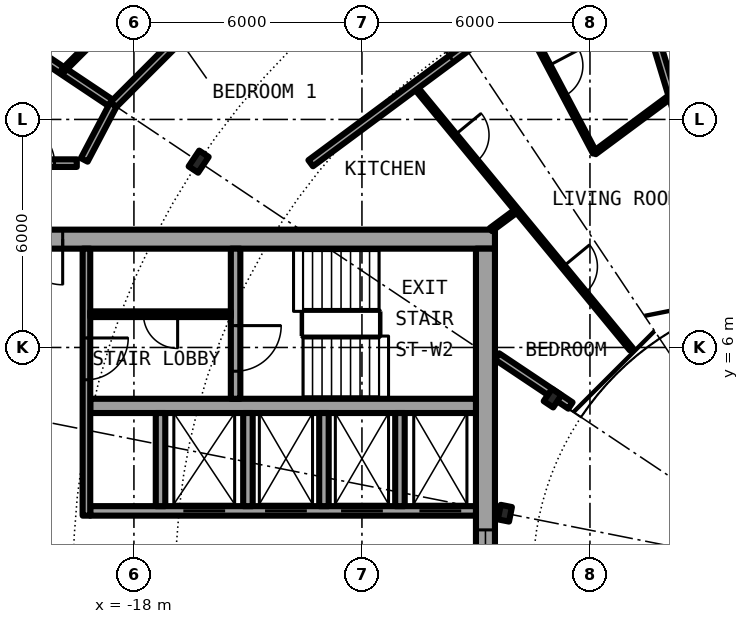
"""IFC4 building model, lengths in metres.
Left out: names, types, materials, properties, quantities, classifications, styles, units other than length and angle.
Written with IfcOpenShell. Run it as: python <this file> out.ifc"""

import sys

from ifc_helpers import new_model, si_unit, direction, frame, frame_2d, origin, origin_2d, place, context, subcontext, project, spatial, rectangle, i_section, extrude, element, fill, save


model = new_model("IFC4")
c1 = context("Model", 3, precision=1e-05, world=origin(), true_north=direction((0.0, 1.0)))
c2 = subcontext(c1, "Body", "Model", "MODEL_VIEW")
j1 = project(units=[si_unit("LENGTHUNIT", "METRE"), si_unit("PLANEANGLEUNIT", "RADIAN")], contexts=[c1])
p1 = place(None, origin())
s1 = spatial("IfcSite", under=j1, at=p1, CompositionType="ELEMENT")
p2 = place(p1, origin())
s2 = spatial("IfcBuilding", under=s1, at=p2, CompositionType="ELEMENT")
p3 = place(p2, frame((0.0, 0.0, 170.75)))
s3 = spatial("IfcBuildingStorey", under=s2, at=p3, CompositionType="ELEMENT", Elevation=170.75)
p4 = place(p3, frame((-16.297, 10.889, 0.0), z_axis=(0.0, 0.0, 1.0), x_axis=(-0.831469612303, 0.55557023302, 0.0)))
e1 = element("IfcColumn", 1, at=p4, inside=s3, PredefinedType="COLUMN", context=c2, shape_type="SweptSolid", body=[
    extrude(i_section(OverallWidth=0.3, OverallDepth=0.5, WebThickness=0.014, FlangeThickness=0.028, FilletRadius=0.027, at=origin_2d()), origin(), (0.0, 0.0, 1.0), 3.05),
])
for number, where, z_axis, x_axis in (
    (2, (-6.984, 4.667, 0.0), (0.0, 0.0, 1.0), (-0.831, 0.556, 0.0)),
    (3, (-8.239, 1.639, 0.0), (0.0, 0.0, 1.0), (-0.981, 0.195, 0.0)),
):
    element("IfcColumn", number, at=place(p3, frame(where, z_axis=z_axis, x_axis=x_axis)), inside=s3, PredefinedType="COLUMN", context=c2, shape_type="SweptSolid", body=[
        extrude(i_section(OverallWidth=0.3, OverallDepth=0.39, WebThickness=0.011, FlangeThickness=0.019, FilletRadius=0.027, at=origin_2d()), origin(), (0.0, 0.0, 1.0), 3.05),
    ])
p5 = place(p3, frame((-8.5, 8.85, 0.0), z_axis=(0.0, 0.0, 1.0), x_axis=(-1.0, 0.0, 0.0)))
e4 = element("IfcWall", 4, at=p5, inside=s3, PredefinedType="SHEAR", context=c2, shape_type="SweptSolid", body=[
    extrude(rectangle(XDim=13.6, YDim=0.5, at=frame_2d((6.8, 0.0))), origin(), (0.0, 0.0, 1.0), 3.05),
])
p6 = place(p5, frame((11.375, 0.0, 0.0)))
e5 = element("IfcOpeningElement", 5, at=p6, cuts=e4, PredefinedType="OPENING", context=c2, shape_type="SweptSolid", body=[
    extrude(rectangle(XDim=1.2, YDim=2.3, at=frame_2d((0.6, 1.15))), frame((0.0, 0.26, 0.0), z_axis=(0.0, -1.0, 0.0), x_axis=(1.0, 0.0, 0.0)), (0.0, 0.0, 1.0), 0.52),
])
p7 = place(p3, frame((-8.75, 8.6, 0.0), z_axis=(0.0, 0.0, 1.0), x_axis=(0.0, -1.0, 0.0)))
e6 = element("IfcWall", 6, at=p7, inside=s3, PredefinedType="SHEAR", context=c2, shape_type="SweptSolid", body=[
    extrude(rectangle(XDim=17.2, YDim=0.5, at=frame_2d((8.6, 0.0))), origin(), (0.0, 0.0, 1.0), 3.05),
])
p8 = place(p7, frame((7.4, 0.0, 0.1)))
e7 = element("IfcOpeningElement", 7, at=p8, cuts=e6, PredefinedType="OPENING", context=c2, shape_type="SweptSolid", body=[
    extrude(rectangle(XDim=2.4, YDim=2.2, at=frame_2d((1.2, 1.1))), frame((0.0, 0.26, 0.0), z_axis=(0.0, -1.0, 0.0), x_axis=(1.0, 0.0, 0.0)), (0.0, 0.0, 1.0), 0.52),
])
p9 = place(p3, frame((-9.0, 1.7, 0.0), z_axis=(0.0, 0.0, 1.0), x_axis=(-1.0, 0.0, 0.0)))
e8 = element("IfcWall", 8, at=p9, inside=s3, PredefinedType="SHEAR", context=c2, shape_type="SweptSolid", body=[
    extrude(rectangle(XDim=10.15, YDim=0.25, at=frame_2d((5.075, 0.0))), origin(), (0.0, 0.0, 1.0), 3.05),
])
p10 = place(p9, frame((0.387, 0.0, 0.0)))
e9 = element("IfcOpeningElement", 9, at=p10, cuts=e8, PredefinedType="OPENING", context=c2, shape_type="SweptSolid", body=[
    extrude(rectangle(XDim=1.1, YDim=2.3, at=frame_2d((0.55, 1.15))), frame((0.0, 0.135, 0.0), z_axis=(0.0, -1.0, 0.0), x_axis=(1.0, 0.0, 0.0)), (0.0, 0.0, 1.0), 0.27),
])
p11 = place(p9, frame((2.45, 0.0, 0.0)))
e10 = element("IfcOpeningElement", 10, at=p11, cuts=e8, PredefinedType="OPENING", context=c2, shape_type="SweptSolid", body=[
    extrude(rectangle(XDim=1.1, YDim=2.3, at=frame_2d((0.55, 1.15))), frame((0.0, 0.135, 0.0), z_axis=(0.0, -1.0, 0.0), x_axis=(1.0, 0.0, 0.0)), (0.0, 0.0, 1.0), 0.27),
])
p12 = place(p9, frame((4.45, 0.0, 0.0)))
e11 = element("IfcOpeningElement", 11, at=p12, cuts=e8, PredefinedType="OPENING", context=c2, shape_type="SweptSolid", body=[
    extrude(rectangle(XDim=1.1, YDim=2.3, at=frame_2d((0.55, 1.15))), frame((0.0, 0.135, 0.0), z_axis=(0.0, -1.0, 0.0), x_axis=(1.0, 0.0, 0.0)), (0.0, 0.0, 1.0), 0.27),
])
p13 = place(p9, frame((6.6, 0.0, 0.0)))
e12 = element("IfcOpeningElement", 12, at=p13, cuts=e8, PredefinedType="OPENING", context=c2, shape_type="SweptSolid", body=[
    extrude(rectangle(XDim=1.1, YDim=2.3, at=frame_2d((0.55, 1.15))), frame((0.0, 0.135, 0.0), z_axis=(0.0, -1.0, 0.0), x_axis=(1.0, 0.0, 0.0)), (0.0, 0.0, 1.0), 0.27),
])
p14 = place(p3, frame((-9.0, 4.462, 0.0), z_axis=(0.0, 0.0, 1.0), x_axis=(-1.0, 0.0, 0.0)))
e13 = element("IfcWall", 13, at=p14, inside=s3, PredefinedType="SHEAR", context=c2, shape_type="SweptSolid", body=[
    extrude(rectangle(XDim=10.15, YDim=0.375, at=frame_2d((5.075, 0.0))), origin(), (0.0, 0.0, 1.0), 3.05),
])
p15 = place(p3, frame((-15.325, 8.6, 0.0), z_axis=(0.0, 0.0, 1.0), x_axis=(0.0, -1.0, 0.0)))
e14 = element("IfcWall", 14, at=p15, inside=s3, PredefinedType="SHEAR", context=c2, shape_type="SweptSolid", body=[
    extrude(rectangle(XDim=3.95, YDim=0.25, at=frame_2d((1.975, 0.0))), origin(), (0.0, 0.0, 1.0), 3.05),
])
p16 = place(p15, frame((2.025, 0.0, 0.0)))
e15 = element("IfcOpeningElement", 15, at=p16, cuts=e14, PredefinedType="OPENING", context=c2, shape_type="SweptSolid", body=[
    extrude(rectangle(XDim=1.2, YDim=2.3, at=frame_2d((0.6, 1.15))), frame((0.0, 0.135, 0.0), z_axis=(0.0, -1.0, 0.0), x_axis=(1.0, 0.0, 0.0)), (0.0, 0.0, 1.0), 0.27),
])
for number, where, z_axis, x_axis in (
    (16, (-15.0, 1.825, 0.0), (0.0, 0.0, 1.0), (0.0, 1.0, 0.0)),
    (17, (-17.3, 1.825, 0.0), (0.0, 0.0, 1.0), (0.0, 1.0, 0.0)),
):
    element("IfcWall", number, at=place(p3, frame(where, z_axis=z_axis, x_axis=x_axis)), inside=s3, PredefinedType="SOLIDWALL", context=c2, shape_type="SweptSolid", body=[
        extrude(rectangle(XDim=2.45, YDim=0.25, at=frame_2d((1.225, 0.0))), origin(), (0.0, 0.0, 1.0), 2.7),
    ])
p17 = place(p3, frame((-19.25, 8.6, 0.0), z_axis=(0.0, 0.0, 1.0), x_axis=(0.0, -1.0, 0.0)))
e18 = element("IfcWall", 18, at=p17, inside=s3, PredefinedType="SOLIDWALL", context=c2, shape_type="SweptSolid", body=[
    extrude(rectangle(XDim=7.025, YDim=0.2, at=frame_2d((3.513, 0.0))), origin(), (0.0, 0.0, 1.0), 2.7),
])
p18 = place(p17, frame((2.35, 0.0, 0.0)))
e19 = element("IfcOpeningElement", 19, at=p18, cuts=e18, PredefinedType="OPENING", context=c2, shape_type="SweptSolid", body=[
    extrude(rectangle(XDim=1.1, YDim=2.3, at=frame_2d((0.55, 1.15))), frame((0.0, 0.11, 0.0), z_axis=(0.0, -1.0, 0.0), x_axis=(1.0, 0.0, 0.0)), (0.0, 0.0, 1.0), 0.22),
])
for number, where, z_axis, x_axis in (
    (20, (-11.0, 1.825, 0.0), (0.0, 0.0, 1.0), (0.0, 1.0, 0.0)),
    (21, (-13.0, 1.825, 0.0), (0.0, 0.0, 1.0), (0.0, 1.0, 0.0)),
):
    element("IfcWall", number, at=place(p3, frame(where, z_axis=z_axis, x_axis=x_axis)), inside=s3, PredefinedType="SOLIDWALL", context=c2, shape_type="SweptSolid", body=[
        extrude(rectangle(XDim=2.45, YDim=0.25, at=frame_2d((1.225, 0.0))), origin(), (0.0, 0.0, 1.0), 2.7),
    ])
p19 = place(p3, frame((-15.45, 6.875, 0.0), z_axis=(0.0, 0.0, 1.0), x_axis=(-1.0, 0.0, 0.0)))
e22 = element("IfcWall", 22, at=p19, inside=s3, PredefinedType="PARTITIONING", context=c2, shape_type="SweptSolid", body=[
    extrude(rectangle(XDim=3.7, YDim=0.15, at=frame_2d((1.85, 0.0))), origin(), (0.0, 0.0, 1.0), 2.7),
])
p20 = place(p19, frame((1.4, 0.0, 0.0)))
e23 = element("IfcOpeningElement", 23, at=p20, cuts=e22, PredefinedType="OPENING", context=c2, shape_type="SweptSolid", body=[
    extrude(rectangle(XDim=0.9, YDim=2.3, at=frame_2d((0.45, 1.15))), frame((0.0, 0.085, 0.0), z_axis=(0.0, -1.0, 0.0), x_axis=(1.0, 0.0, 0.0)), (0.0, 0.0, 1.0), 0.17),
])
p21 = place(p3, frame((-22.595, 15.098, 0.0), z_axis=(0.0, 0.0, 1.0), x_axis=(0.831387096605, -0.55569370664, 0.0)))
e24 = element("IfcWall", 24, at=p21, inside=s3, PredefinedType="PARTITIONING", context=c2, shape_type="SweptSolid", body=[
    extrude(rectangle(XDim=4.875, YDim=0.2, at=frame_2d((2.438, 0.0))), origin(), (0.0, 0.0, 1.0), 2.7),
])
p22 = place(p3, frame((-10.616, 12.875, 0.0), z_axis=(0.0, 0.0, 1.0), x_axis=(0.636045954217, -0.771651180342, 0.0)))
e25 = element("IfcWall", 25, at=p22, inside=s3, PredefinedType="PARTITIONING", context=c2, shape_type="SweptSolid", body=[
    extrude(rectangle(XDim=8.968, YDim=0.1, at=frame_2d((4.484, 0.0))), origin(), (0.0, 0.0, 1.0), 2.7),
])
p23 = place(p22, frame((1.667, 0.0, 0.0)))
e26 = element("IfcOpeningElement", 26, at=p23, cuts=e25, PredefinedType="OPENING", context=c2, shape_type="SweptSolid", body=[
    extrude(rectangle(XDim=0.9, YDim=2.3, at=frame_2d((0.45, 1.15))), frame((0.0, 0.06, 0.0), z_axis=(0.0, -1.0, 0.0), x_axis=(1.0, 0.0, 0.0)), (0.0, 0.0, 1.0), 0.12),
])
p24 = place(p22, frame((6.151, 0.0, 0.0)))
e27 = element("IfcOpeningElement", 27, at=p24, cuts=e25, PredefinedType="OPENING", context=c2, shape_type="SweptSolid", body=[
    extrude(rectangle(XDim=0.9, YDim=2.3, at=frame_2d((0.45, 1.15))), frame((0.0, 0.06, 0.0), z_axis=(0.0, -1.0, 0.0), x_axis=(1.0, 0.0, 0.0)), (0.0, 0.0, 1.0), 0.12),
])
p25 = place(p3, frame((-7.875, 14.908, 0.0), z_axis=(0.0, 0.0, 1.0), x_axis=(0.467030118529, -0.884241408432, 0.0)))
e28 = element("IfcWall", 28, at=p25, inside=s3, PredefinedType="PARTITIONING", context=c2, shape_type="SweptSolid", body=[
    extrude(rectangle(XDim=4.278, YDim=0.1, at=frame_2d((2.139, 0.0))), origin(), (0.0, 0.0, 1.0), 2.7),
])
p26 = place(p25, frame((1.689, 0.0, 0.0)))
e29 = element("IfcOpeningElement", 29, at=p26, cuts=e28, PredefinedType="OPENING", context=c2, shape_type="SweptSolid", body=[
    extrude(rectangle(XDim=0.9, YDim=2.3, at=frame_2d((0.45, 1.15))), frame((0.0, 0.06, 0.0), z_axis=(0.0, -1.0, 0.0), x_axis=(1.0, 0.0, 0.0)), (0.0, 0.0, 1.0), 0.12),
])
p27 = place(p3, frame((-5.14, 16.937, 0.0), z_axis=(0.0, 0.0, 1.0), x_axis=(0.290401199794, -0.956904981259, 0.0)))
e30 = element("IfcWall", 30, at=p27, inside=s3, PredefinedType="PARTITIONING", context=c2, shape_type="SweptSolid", body=[
    extrude(rectangle(XDim=9.979, YDim=0.2, at=frame_2d((4.99, 0.0))), origin(), (0.0, 0.0, 1.0), 2.7),
])
p28 = place(p3, frame((-6.513, 4.472, 0.0), z_axis=(0.0, 0.0, 1.0), x_axis=(-0.83133816625, 0.555766905579, 0.0)))
e31 = element("IfcWall", 31, at=p28, inside=s3, PredefinedType="PARTITIONING", context=c2, shape_type="SweptSolid", body=[
    extrude(rectangle(XDim=2.323, YDim=0.2, at=frame_2d((1.162, 0.0))), origin(), (0.0, 0.0, 1.0), 2.7),
])
p29 = place(p3, frame((-21.675, 10.85, 0.0), z_axis=(0.0, 0.0, 1.0), x_axis=(1.0, 0.0, 0.0)))
e32 = element("IfcWall", 32, at=p29, inside=s3, PredefinedType="PARTITIONING", context=c2, shape_type="SweptSolid", body=[
    extrude(rectangle(XDim=2.171, YDim=0.2, at=frame_2d((1.085, 0.0))), origin(), (0.0, 0.0, 1.0), 2.7),
])
p30 = place(p29, frame((0.585, 0.0, 0.0)))
e33 = element("IfcOpeningElement", 33, at=p30, cuts=e32, PredefinedType="OPENING", context=c2, shape_type="SweptSolid", body=[
    extrude(rectangle(XDim=1.0, YDim=2.3, at=frame_2d((0.5, 1.15))), frame((0.0, 0.11, 0.0), z_axis=(0.0, -1.0, 0.0), x_axis=(1.0, 0.0, 0.0)), (0.0, 0.0, 1.0), 0.22),
])
p31 = place(p3, frame((-8.607, 9.1, 0.0), z_axis=(0.0, 0.0, 1.0), x_axis=(0.803199066515, 0.595710718007, 0.0)))
e34 = element("IfcWall", 34, at=p31, inside=s3, PredefinedType="PARTITIONING", context=c2, shape_type="SweptSolid", body=[
    extrude(rectangle(XDim=0.858, YDim=0.1, at=frame_2d((0.429, 0.0))), origin(), (0.0, 0.0, 1.0), 2.7),
])
p32 = place(p3, frame((-5.877, 11.125, 0.0), z_axis=(0.0, 0.0, 1.0), x_axis=(0.803259509791, 0.595629213463, 0.0)))
e35 = element("IfcWall", 35, at=p32, inside=s3, PredefinedType="PARTITIONING", context=c2, shape_type="SweptSolid", body=[
    extrude(rectangle(XDim=2.543, YDim=0.1, at=frame_2d((1.272, 0.0))), origin(), (0.0, 0.0, 1.0), 2.7),
])
p33 = place(p3, frame((-13.349, 10.848, 0.0), z_axis=(0.0, 0.0, 1.0), x_axis=(0.803229232922, 0.595670042371, 0.0)))
e36 = element("IfcWall", 36, at=p33, inside=s3, PredefinedType="PARTITIONING", context=c2, shape_type="SweptSolid", body=[
    extrude(rectangle(XDim=10.224, YDim=0.2, at=frame_2d((5.112, 0.0))), origin(), (0.0, 0.0, 1.0), 2.7),
])
p34 = place(p33, frame((4.612, 0.0, 0.0)))
e37 = element("IfcOpeningElement", 37, at=p34, cuts=e36, PredefinedType="OPENING", context=c2, shape_type="SweptSolid", body=[
    extrude(rectangle(XDim=1.0, YDim=2.3, at=frame_2d((0.5, 1.15))), frame((0.0, 0.11, 0.0), z_axis=(0.0, -1.0, 0.0), x_axis=(1.0, 0.0, 0.0)), (0.0, 0.0, 1.0), 0.22),
])
p35 = place(p3, frame((-18.542, 12.389, 0.0), z_axis=(0.0, 0.0, 1.0), x_axis=(0.707106781187, 0.707106781187, 0.0)))
e38 = element("IfcWall", 38, at=p35, inside=s3, PredefinedType="PARTITIONING", context=c2, shape_type="SweptSolid", body=[
    extrude(rectangle(XDim=8.702, YDim=0.2, at=frame_2d((4.351, 0.0))), origin(), (0.0, 0.0, 1.0), 2.7),
])
p36 = place(p35, frame((2.763, 0.0, 0.0)))
e39 = element("IfcOpeningElement", 39, at=p36, cuts=e38, PredefinedType="OPENING", context=c2, shape_type="SweptSolid", body=[
    extrude(rectangle(XDim=1.0, YDim=2.3, at=frame_2d((0.5, 1.15))), frame((0.0, 0.11, 0.0), z_axis=(0.0, -1.0, 0.0), x_axis=(1.0, 0.0, 0.0)), (0.0, 0.0, 1.0), 0.22),
])
p37 = place(p3, frame((-19.307, 10.935, 0.0), z_axis=(0.0, 0.0, 1.0), x_axis=(0.465605550524, 0.884992356646, 0.0)))
e40 = element("IfcWall", 40, at=p37, inside=s3, PredefinedType="PARTITIONING", context=c2, shape_type="SweptSolid", body=[
    extrude(rectangle(XDim=1.643, YDim=0.2, at=frame_2d((0.821, 0.0))), origin(), (0.0, 0.0, 1.0), 2.7),
])
p38 = place(p3, frame((-19.872, 13.278, 0.0), z_axis=(0.0, 0.0, 1.0), x_axis=(0.707132961115, 0.707080600289, 0.0)))
e41 = element("IfcWall", 41, at=p38, inside=s3, PredefinedType="PARTITIONING", context=c2, shape_type="SweptSolid", body=[
    extrude(rectangle(XDim=4.663, YDim=0.1, at=frame_2d((2.331, 0.0))), origin(), (0.0, 0.0, 1.0), 2.7),
])
p39 = place(p38, frame((0.719, 0.0, 0.0)))
e42 = element("IfcOpeningElement", 42, at=p39, cuts=e41, PredefinedType="OPENING", context=c2, shape_type="SweptSolid", body=[
    extrude(rectangle(XDim=0.9, YDim=2.3, at=frame_2d((0.45, 1.15))), frame((0.0, 0.06, 0.0), z_axis=(0.0, -1.0, 0.0), x_axis=(1.0, 0.0, 0.0)), (0.0, 0.0, 1.0), 0.12),
])
p40 = place(p10, origin())
e43 = element("IfcDoor", 43, at=p40, inside=s3, OperationType="DOUBLE_DOOR_SLIDING", PredefinedType="DOOR", context=c2, shape_type="SweptSolid", body=[
    extrude(rectangle(XDim=1.1, YDim=2.3, at=frame_2d((0.55, 1.15))), frame((0.0, 0.025, 0.0), z_axis=(0.0, -1.0, 0.0), x_axis=(1.0, 0.0, 0.0)), (0.0, 0.0, 1.0), 0.05),
])
fill(e9, e43)
p41 = place(p11, origin())
e44 = element("IfcDoor", 44, at=p41, inside=s3, OperationType="DOUBLE_DOOR_SLIDING", PredefinedType="DOOR", context=c2, shape_type="SweptSolid", body=[
    extrude(rectangle(XDim=1.1, YDim=2.3, at=frame_2d((0.55, 1.15))), frame((0.0, 0.025, 0.0), z_axis=(0.0, -1.0, 0.0), x_axis=(1.0, 0.0, 0.0)), (0.0, 0.0, 1.0), 0.05),
])
fill(e10, e44)
p42 = place(p12, origin())
e45 = element("IfcDoor", 45, at=p42, inside=s3, OperationType="DOUBLE_DOOR_SLIDING", PredefinedType="DOOR", context=c2, shape_type="SweptSolid", body=[
    extrude(rectangle(XDim=1.1, YDim=2.3, at=frame_2d((0.55, 1.15))), frame((0.0, 0.025, 0.0), z_axis=(0.0, -1.0, 0.0), x_axis=(1.0, 0.0, 0.0)), (0.0, 0.0, 1.0), 0.05),
])
fill(e11, e45)
p43 = place(p13, origin())
e46 = element("IfcDoor", 46, at=p43, inside=s3, OperationType="DOUBLE_DOOR_SLIDING", PredefinedType="DOOR", context=c2, shape_type="SweptSolid", body=[
    extrude(rectangle(XDim=1.1, YDim=2.3, at=frame_2d((0.55, 1.15))), frame((0.0, 0.025, 0.0), z_axis=(0.0, -1.0, 0.0), x_axis=(1.0, 0.0, 0.0)), (0.0, 0.0, 1.0), 0.05),
])
fill(e12, e46)
p44 = place(p20, origin())
e47 = element("IfcDoor", 47, at=p44, inside=s3, OperationType="SINGLE_SWING_LEFT", PredefinedType="DOOR", context=c2, shape_type="SweptSolid", body=[
    extrude(rectangle(XDim=0.9, YDim=2.3, at=frame_2d((0.45, 1.15))), frame((0.0, 0.025, 0.0), z_axis=(0.0, -1.0, 0.0), x_axis=(1.0, 0.0, 0.0)), (0.0, 0.0, 1.0), 0.05),
])
fill(e23, e47)
p45 = place(p16, origin())
e48 = element("IfcDoor", 48, at=p45, inside=s3, OperationType="SINGLE_SWING_LEFT", PredefinedType="DOOR", context=c2, shape_type="SweptSolid", body=[
    extrude(rectangle(XDim=1.2, YDim=2.3, at=frame_2d((0.6, 1.15))), frame((0.0, 0.025, 0.0), z_axis=(0.0, -1.0, 0.0), x_axis=(1.0, 0.0, 0.0)), (0.0, 0.0, 1.0), 0.05),
])
fill(e15, e48)
p46 = place(p18, origin())
e49 = element("IfcDoor", 49, at=p46, inside=s3, OperationType="SINGLE_SWING_RIGHT", PredefinedType="DOOR", context=c2, shape_type="SweptSolid", body=[
    extrude(rectangle(XDim=1.1, YDim=2.3, at=frame_2d((0.55, 1.15))), frame((0.0, 0.025, 0.0), z_axis=(0.0, -1.0, 0.0), x_axis=(1.0, 0.0, 0.0)), (0.0, 0.0, 1.0), 0.05),
])
fill(e19, e49)
p47 = place(p6, origin())
e50 = element("IfcDoor", 50, at=p47, inside=s3, OperationType="SINGLE_SWING_LEFT", PredefinedType="DOOR", context=c2, shape_type="SweptSolid", body=[
    extrude(rectangle(XDim=1.2, YDim=2.3, at=frame_2d((0.6, 1.15))), frame((0.0, 0.025, 0.0), z_axis=(0.0, -1.0, 0.0), x_axis=(1.0, 0.0, 0.0)), (0.0, 0.0, 1.0), 0.05),
])
fill(e5, e50)
p48 = place(p8, origin())
e51 = element("IfcWindow", 51, at=p48, inside=s3, PartitioningType="SINGLE_PANEL", PredefinedType="WINDOW", context=c2, shape_type="SweptSolid", body=[
    extrude(rectangle(XDim=2.4, YDim=2.2, at=frame_2d((1.2, 1.1))), frame((0.0, 0.03, 0.0), z_axis=(0.0, -1.0, 0.0), x_axis=(1.0, 0.0, 0.0)), (0.0, 0.0, 1.0), 0.06),
])
fill(e7, e51)
p49 = place(p34, origin())
e52 = element("IfcDoor", 52, at=p49, inside=s3, OperationType="SINGLE_SWING_LEFT", PredefinedType="DOOR", context=c2, shape_type="SweptSolid", body=[
    extrude(rectangle(XDim=1.0, YDim=2.3, at=frame_2d((0.5, 1.15))), frame((0.0, 0.025, 0.0), z_axis=(0.0, -1.0, 0.0), x_axis=(1.0, 0.0, 0.0)), (0.0, 0.0, 1.0), 0.05),
])
fill(e37, e52)
p50 = place(p26, origin())
e53 = element("IfcDoor", 53, at=p50, inside=s3, OperationType="SINGLE_SWING_RIGHT", PredefinedType="DOOR", context=c2, shape_type="SweptSolid", body=[
    extrude(rectangle(XDim=0.9, YDim=2.3, at=frame_2d((0.45, 1.15))), frame((0.0, 0.025, 0.0), z_axis=(0.0, -1.0, 0.0), x_axis=(1.0, 0.0, 0.0)), (0.0, 0.0, 1.0), 0.05),
])
fill(e29, e53)
p51 = place(p23, origin())
e54 = element("IfcDoor", 54, at=p51, inside=s3, OperationType="SINGLE_SWING_LEFT", PredefinedType="DOOR", context=c2, shape_type="SweptSolid", body=[
    extrude(rectangle(XDim=0.9, YDim=2.3, at=frame_2d((0.45, 1.15))), frame((0.0, 0.025, 0.0), z_axis=(0.0, -1.0, 0.0), x_axis=(1.0, 0.0, 0.0)), (0.0, 0.0, 1.0), 0.05),
])
fill(e26, e54)
p52 = place(p24, origin())
e55 = element("IfcDoor", 55, at=p52, inside=s3, OperationType="SINGLE_SWING_RIGHT", PredefinedType="DOOR", context=c2, shape_type="SweptSolid", body=[
    extrude(rectangle(XDim=0.9, YDim=2.3, at=frame_2d((0.45, 1.15))), frame((0.0, 0.025, 0.0), z_axis=(0.0, -1.0, 0.0), x_axis=(1.0, 0.0, 0.0)), (0.0, 0.0, 1.0), 0.05),
])
fill(e27, e55)
p53 = place(p30, origin())
e56 = element("IfcDoor", 56, at=p53, inside=s3, OperationType="SINGLE_SWING_LEFT", PredefinedType="DOOR", context=c2, shape_type="SweptSolid", body=[
    extrude(rectangle(XDim=1.0, YDim=2.3, at=frame_2d((0.5, 1.15))), frame((0.0, 0.025, 0.0), z_axis=(0.0, -1.0, 0.0), x_axis=(1.0, 0.0, 0.0)), (0.0, 0.0, 1.0), 0.05),
])
fill(e33, e56)
save(model, sys.argv[1])
